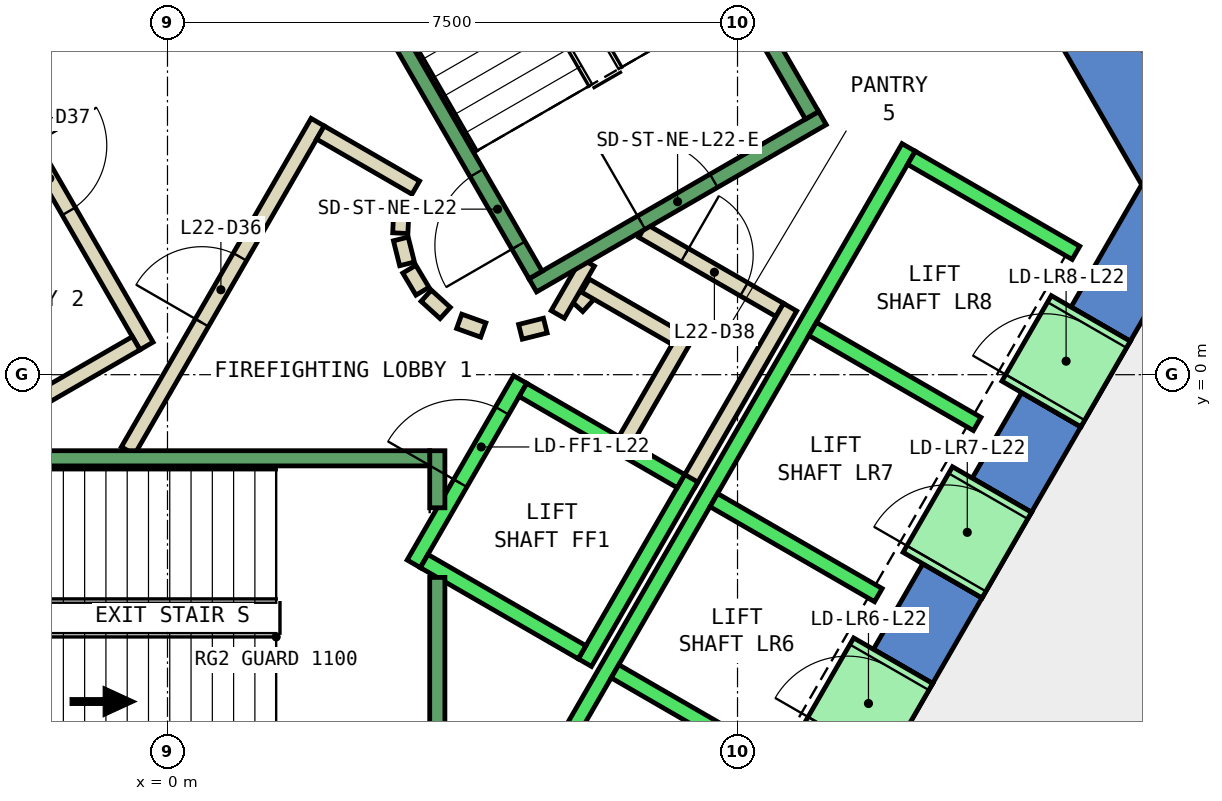
"""IFC4 building model, lengths in metres.
Left out: names, types, materials, properties, quantities, classifications, styles, units other than length and angle.
Written with IfcOpenShell. Run it as: python <this file> out.ifc"""

import sys

from ifc_helpers import new_model, si_unit, direction, frame, frame_2d, origin, place, context, subcontext, project, spatial, polyline, rectangle, outline, extrude, element, fill, save


model = new_model("IFC4")
c1 = context("Model", 3, precision=1e-05, world=origin(), true_north=direction((0.0, 1.0)))
c2 = subcontext(c1, "Body", "Model", "MODEL_VIEW")
j1 = project(units=[si_unit("LENGTHUNIT", "METRE"), si_unit("PLANEANGLEUNIT", "RADIAN")], contexts=[c1])
p1 = place(None, origin())
s1 = spatial("IfcSite", under=j1, at=p1, CompositionType="ELEMENT")
p2 = place(p1, origin())
s2 = spatial("IfcBuilding", under=s1, at=p2, CompositionType="ELEMENT")
p3 = place(p2, frame((0.0, 0.0, 103.4)))
s3 = spatial("IfcBuildingStorey", under=s2, at=p3, CompositionType="ELEMENT", Elevation=103.4)
p4 = place(p3, frame((0.0, 0.0, -0.4)))
e1 = element("IfcWall", 1, at=p4, inside=s3, PredefinedType="SHEAR", context=c2, shape_type="SweptSolid", body=[
    extrude(outline(polyline([(8.517, 11.748), (7.738, 11.298), (12.817, 2.5), (13.856, 2.5), (8.517, 11.748)])), origin(), (0.0, 0.0, 1.0), 4.2),
])
p5 = place(p3, frame((0.0, 0.0, -0.4)))
e2 = element("IfcWall", 2, at=p5, inside=s3, PredefinedType="SHEAR", context=c2, shape_type="SweptSolid", body=[
    extrude(outline(polyline([(10.717, -2.937), (9.938, -2.487), (9.288, -3.613), (10.067, -4.063), (10.717, -2.937)])), origin(), (0.0, 0.0, 1.0), 4.2),
])
p6 = place(p3, frame((0.0, 0.0, -0.4)))
e3 = element("IfcWall", 3, at=p6, inside=s3, PredefinedType="SHEAR", context=c2, shape_type="SweptSolid", body=[
    extrude(outline(polyline([(12.017, -0.686), (11.238, -0.236), (10.588, -1.361), (11.367, -1.811), (12.017, -0.686)])), origin(), (0.0, 0.0, 1.0), 4.2),
])
p7 = place(p3, frame((0.0, 0.0, -0.4)))
e4 = element("IfcWall", 4, at=p7, inside=s3, PredefinedType="SHEAR", context=c2, shape_type="SweptSolid", body=[
    extrude(outline(polyline([(11.888, 0.89), (12.667, 0.44), (13.856, 2.5), (12.817, 2.5), (11.888, 0.89)])), origin(), (0.0, 0.0, 1.0), 4.2),
])
p8 = place(p3, frame((0.0, 0.0, 3.6)))
e5 = element("IfcWall", 5, at=p8, inside=s3, PredefinedType="SHEAR", context=c2, shape_type="SweptSolid", body=[
    extrude(outline(polyline([(10.067, -4.063), (9.288, -3.613), (8.638, -4.739), (9.417, -5.189), (10.067, -4.063)])), origin(), (0.0, 0.0, 1.0), 0.2),
])
p9 = place(p3, frame((0.0, 0.0, 3.6)))
e6 = element("IfcWall", 6, at=p9, inside=s3, PredefinedType="SHEAR", context=c2, shape_type="SweptSolid", body=[
    extrude(outline(polyline([(11.367, -1.811), (10.588, -1.361), (9.938, -2.487), (10.717, -2.937), (11.367, -1.811)])), origin(), (0.0, 0.0, 1.0), 0.2),
])
p10 = place(p3, frame((0.0, 0.0, 3.6)))
e7 = element("IfcWall", 7, at=p10, inside=s3, PredefinedType="SHEAR", context=c2, shape_type="SweptSolid", body=[
    extrude(outline(polyline([(12.667, 0.44), (11.888, 0.89), (11.238, -0.236), (12.017, -0.686), (12.667, 0.44)])), origin(), (0.0, 0.0, 1.0), 0.2),
])
p11 = place(p3, frame((5.39, 0.898, 0.0), z_axis=(0.0, 0.0, 1.0), x_axis=(0.673828488714, 0.738887791073, 0.0)))
e8 = element("IfcWall", 8, at=p11, inside=s3, PredefinedType="PARTITIONING", context=c2, shape_type="SweptSolid", body=[
    extrude(rectangle(XDim=0.263, YDim=0.2, at=frame_2d((0.131, 0.0))), origin(), (0.0, 0.0, 1.0), 3.8),
])
p12 = place(p3, frame((5.499, 1.172, 0.0), z_axis=(0.0, 0.0, 1.0), x_axis=(0.866333505267, -0.499465972466, 0.0)))
e9 = element("IfcWall", 9, at=p12, inside=s3, PredefinedType="PARTITIONING", context=c2, shape_type="SweptSolid", body=[
    extrude(rectangle(XDim=1.374, YDim=0.2, at=frame_2d((0.687, 0.0))), origin(), (0.0, 0.0, 1.0), 3.8),
])
p13 = place(p3, frame((6.826, 0.522, 0.0), z_axis=(0.0, 0.0, 1.0), x_axis=(-0.500016722714, -0.866015748706, 0.0)))
e10 = element("IfcWall", 10, at=p13, inside=s3, PredefinedType="PARTITIONING", context=c2, shape_type="SweptSolid", body=[
    extrude(rectangle(XDim=1.7, YDim=0.2, at=frame_2d((0.85, 0.0))), origin(), (0.0, 0.0, 1.0), 3.8),
])
p14 = place(p3, frame((6.25, 1.894, 0.0), z_axis=(0.0, 0.0, 1.0), x_axis=(0.866043184279, -0.499969202016, 0.0)))
e11 = element("IfcWall", 11, at=p14, inside=s3, PredefinedType="PARTITIONING", context=c2, shape_type="SweptSolid", body=[
    extrude(rectangle(XDim=2.084, YDim=0.2, at=frame_2d((1.042, 0.0))), origin(), (0.0, 0.0, 1.0), 3.8),
])
p15 = place(p14, frame((0.642, 0.0, 0.0)))
e12 = element("IfcOpeningElement", 12, at=p15, cuts=e11, PredefinedType="OPENING", context=c2, shape_type="SweptSolid", body=[
    extrude(rectangle(XDim=0.9, YDim=2.1, at=frame_2d((0.45, 1.05))), frame((0.0, 0.11, 0.0), z_axis=(0.0, -1.0, 0.0), x_axis=(1.0, 0.0, 0.0)), (0.0, 0.0, 1.0), 0.22),
])
p16 = place(p3, frame((8.192, 0.888, 0.0), z_axis=(0.0, 0.0, 1.0), x_axis=(-0.499940625693, -0.866059680843, 0.0)))
e13 = element("IfcWall", 13, at=p16, inside=s3, PredefinedType="PARTITIONING", context=c2, shape_type="SweptSolid", body=[
    extrude(rectangle(XDim=2.68, YDim=0.2, at=frame_2d((1.34, 0.0))), origin(), (0.0, 0.0, 1.0), 3.8),
])
p17 = place(p3, frame((5.135, 0.793, 0.0), z_axis=(0.0, 0.0, 1.0), x_axis=(0.499526442893, 0.866298639529, 0.0)))
e14 = element("IfcWall", 14, at=p17, inside=s3, PredefinedType="PARTITIONING", context=c2, shape_type="SweptSolid", body=[
    extrude(rectangle(XDim=0.791, YDim=0.2, at=frame_2d((0.396, 0.0))), origin(), (0.0, 0.0, 1.0), 3.8),
])
p18 = place(p3, frame((-0.52, -1.0, 0.0), z_axis=(0.0, 0.0, 1.0), x_axis=(0.50011622646, 0.865958290007, 0.0)))
e15 = element("IfcWall", 15, at=p18, inside=s3, PredefinedType="PARTITIONING", context=c2, shape_type="SweptSolid", body=[
    extrude(rectangle(XDim=4.991, YDim=0.2, at=frame_2d((2.496, 0.0))), origin(), (0.0, 0.0, 1.0), 3.8),
])
p19 = place(p18, frame((1.945, 0.0, 0.0)))
e16 = element("IfcOpeningElement", 16, at=p19, cuts=e15, PredefinedType="OPENING", context=c2, shape_type="SweptSolid", body=[
    extrude(rectangle(XDim=1.0, YDim=2.1, at=frame_2d((0.5, 1.05))), frame((0.0, 0.11, 0.0), z_axis=(0.0, -1.0, 0.0), x_axis=(1.0, 0.0, 0.0)), (0.0, 0.0, 1.0), 0.22),
])
p20 = place(p3, frame((2.012, 3.186, 0.0), z_axis=(0.0, 0.0, 1.0), x_axis=(0.865891012941, -0.500232699559, 0.0)))
e17 = element("IfcWall", 17, at=p20, inside=s3, PredefinedType="PARTITIONING", context=c2, shape_type="SweptSolid", body=[
    extrude(rectangle(XDim=1.449, YDim=0.2, at=frame_2d((0.725, 0.0))), origin(), (0.0, 0.0, 1.0), 3.8),
])
p21 = place(p3, frame((3.079, 2.199, 0.0), z_axis=(0.0, 0.0, 1.0), x_axis=(-0.047771483479, -0.998858290933, 0.0)))
e18 = element("IfcWall", 18, at=p21, inside=s3, PredefinedType="PARTITIONING", context=c2, shape_type="SweptSolid", body=[
    extrude(rectangle(XDim=0.337, YDim=0.2, at=frame_2d((0.169, 0.0))), origin(), (0.0, 0.0, 1.0), 3.8),
])
p22 = place(p3, frame((3.07, 1.786, 0.0), z_axis=(0.0, 0.0, 1.0), x_axis=(0.242705583207, -0.970099994784, 0.0)))
e19 = element("IfcWall", 19, at=p22, inside=s3, PredefinedType="PARTITIONING", context=c2, shape_type="SweptSolid", body=[
    extrude(rectangle(XDim=0.338, YDim=0.2, at=frame_2d((0.169, 0.0))), origin(), (0.0, 0.0, 1.0), 3.8),
])
for number, where, z_axis, x_axis in (
    (20, (3.182, 1.388, 0.0), (0.0, 0.0, 1.0), (0.512, -0.859, 0.0)),
    (21, (3.404, 1.039, 0.0), (0.0, 0.0, 1.0), (0.74, -0.672, 0.0)),
):
    element("IfcWall", number, at=place(p3, frame(where, z_axis=z_axis, x_axis=x_axis)), inside=s3, PredefinedType="PARTITIONING", context=c2, shape_type="SweptSolid", body=[
        extrude(rectangle(XDim=0.338, YDim=0.2, at=frame_2d((0.169, 0.0))), origin(), (0.0, 0.0, 1.0), 3.8),
    ])
p23 = place(p3, frame((3.838, 0.702, 0.0), z_axis=(0.0, 0.0, 1.0), x_axis=(0.941035081519, -0.338308993895, 0.0)))
e22 = element("IfcWall", 22, at=p23, inside=s3, PredefinedType="PARTITIONING", context=c2, shape_type="SweptSolid", body=[
    extrude(rectangle(XDim=0.337, YDim=0.2, at=frame_2d((0.168, 0.0))), origin(), (0.0, 0.0, 1.0), 3.8),
])
p24 = place(p3, frame((4.644, 0.564, 0.0), z_axis=(0.0, 0.0, 1.0), x_axis=(0.969929076366, 0.243387729394, 0.0)))
e23 = element("IfcWall", 23, at=p24, inside=s3, PredefinedType="PARTITIONING", context=c2, shape_type="SweptSolid", body=[
    extrude(rectangle(XDim=0.337, YDim=0.2, at=frame_2d((0.168, 0.0))), origin(), (0.0, 0.0, 1.0), 3.8),
])
p25 = place(p3, frame((-2.771, 4.7, 0.0), z_axis=(0.0, 0.0, 1.0), x_axis=(0.499969479948, -0.866043023828, 0.0)))
e24 = element("IfcWall", 24, at=p25, inside=s3, PredefinedType="PARTITIONING", context=c2, shape_type="SweptSolid", body=[
    extrude(rectangle(XDim=4.99, YDim=0.2, at=frame_2d((2.495, 0.0))), origin(), (0.0, 0.0, 1.0), 3.8),
])
p26 = place(p25, frame((1.945, 0.0, 0.0)))
e25 = element("IfcOpeningElement", 25, at=p26, cuts=e24, PredefinedType="OPENING", context=c2, shape_type="SweptSolid", body=[
    extrude(rectangle(XDim=1.0, YDim=2.1, at=frame_2d((0.5, 1.05))), frame((0.0, 0.11, 0.0), z_axis=(0.0, -1.0, 0.0), x_axis=(1.0, 0.0, 0.0)), (0.0, 0.0, 1.0), 0.22),
])
p27 = place(p3, frame((-0.412, 0.414, 0.0), z_axis=(0.0, 0.0, 1.0), x_axis=(-0.866017369001, -0.500013916395, 0.0)))
e26 = element("IfcWall", 26, at=p27, inside=s3, PredefinedType="PARTITIONING", context=c2, shape_type="SweptSolid", body=[
    extrude(rectangle(XDim=1.45, YDim=0.2, at=frame_2d((0.725, 0.0))), origin(), (0.0, 0.0, 1.0), 3.8),
])
p28 = place(p3, frame((18.503, 2.949, 0.0), z_axis=(0.0, 0.0, 1.0), x_axis=(-0.49997390151, -0.86604047123, 0.0)))
e27 = element("IfcWall", 27, at=p28, inside=s3, PredefinedType="PARTITIONING", context=c2, shape_type="SweptSolid", body=[
    extrude(rectangle(XDim=11.626, YDim=0.2, at=frame_2d((5.813, 0.0))), origin(), (0.0, 0.0, 1.0), 3.8),
])
p29 = place(p3, frame((3.24, -2.488, 0.0), z_axis=(0.0, 0.0, 1.0), x_axis=(0.49994636267, 0.866056369097, 0.0)))
e28 = element("IfcWall", 28, at=p29, inside=s3, PredefinedType="STANDARD", context=c2, shape_type="SweptSolid", body=[
    extrude(rectangle(XDim=2.8, YDim=0.2, at=frame_2d((1.4, 0.0))), origin(), (0.0, 0.0, 1.0), 3.8),
])
p30 = place(p29, frame((1.225, 0.0, 0.0)))
e29 = element("IfcOpeningElement", 29, at=p30, cuts=e28, PredefinedType="OPENING", context=c2, shape_type="SweptSolid", body=[
    extrude(rectangle(XDim=1.1, YDim=2.1, at=frame_2d((0.55, 1.05))), frame((0.0, 0.11, 0.0), z_axis=(0.0, -1.0, 0.0), x_axis=(1.0, 0.0, 0.0)), (0.0, 0.0, 1.0), 0.22),
])
p31 = place(p3, frame((5.492, -3.788, 0.0), z_axis=(0.0, 0.0, 1.0), x_axis=(0.500011755427, 0.866018616679, 0.0)))
e30 = element("IfcWall", 30, at=p31, inside=s3, PredefinedType="STANDARD", context=c2, shape_type="SweptSolid", body=[
    extrude(rectangle(XDim=2.8, YDim=0.2, at=frame_2d((1.4, 0.0))), origin(), (0.0, 0.0, 1.0), 3.8),
])
p32 = place(p3, frame((3.377, -2.452, 0.0), z_axis=(0.0, 0.0, 1.0), x_axis=(0.865955154139, -0.50012165622, 0.0)))
e31 = element("IfcWall", 31, at=p32, inside=s3, PredefinedType="STANDARD", context=c2, shape_type="SweptSolid", body=[
    extrude(rectangle(XDim=2.4, YDim=0.2, at=frame_2d((1.2, 0.0))), origin(), (0.0, 0.0, 1.0), 3.8),
])
p33 = place(p3, frame((4.677, -0.2, 0.0), z_axis=(0.0, 0.0, 1.0), x_axis=(0.865973769406, -0.500089422704, 0.0)))
e32 = element("IfcWall", 32, at=p33, inside=s3, PredefinedType="STANDARD", context=c2, shape_type="SweptSolid", body=[
    extrude(rectangle(XDim=2.399, YDim=0.2, at=frame_2d((1.2, 0.0))), origin(), (0.0, 0.0, 1.0), 3.8),
])
p34 = place(p3, frame((4.451, -6.19, 0.0), z_axis=(0.0, 0.0, 1.0), x_axis=(0.50000090737, 0.866024879913, 0.0)))
e33 = element("IfcWall", 33, at=p34, inside=s3, PredefinedType="STANDARD", context=c2, shape_type="SweptSolid", body=[
    extrude(rectangle(XDim=10.6, YDim=0.2, at=frame_2d((5.3, 0.0))), origin(), (0.0, 0.0, 1.0), 3.8),
])
for number, where, z_axis, x_axis in (
    (34, (5.888, -3.902, 0.0), (0.0, 0.0, 1.0), (0.866, -0.5, 0.0)),
    (35, (7.188, -1.65, 0.0), (0.0, 0.0, 1.0), (0.866, -0.5, 0.0)),
    (36, (8.488, 0.602, 0.0), (0.0, 0.0, 1.0), (0.866, -0.5, 0.0)),
):
    element("IfcWall", number, at=place(p3, frame(where, z_axis=z_axis, x_axis=x_axis)), inside=s3, PredefinedType="STANDARD", context=c2, shape_type="SweptSolid", body=[
        extrude(rectangle(XDim=2.5, YDim=0.2, at=frame_2d((1.25, 0.0))), origin(), (0.0, 0.0, 1.0), 3.8),
    ])
p35 = place(p3, frame((9.788, 2.853, 0.0), z_axis=(0.0, 0.0, 1.0), x_axis=(0.865998541277, -0.500046524342, 0.0)))
e37 = element("IfcWall", 37, at=p35, inside=s3, PredefinedType="STANDARD", context=c2, shape_type="SweptSolid", body=[
    extrude(rectangle(XDim=2.5, YDim=0.2, at=frame_2d((1.25, 0.0))), origin(), (0.0, 0.0, 1.0), 3.8),
])
p36 = place(p3, frame((8.898, -4.889, 0.0), z_axis=(0.0, 0.0, 1.0), x_axis=(0.500036693733, 0.866004217611, 0.0)))
e38 = element("IfcWall", 38, at=p36, inside=s3, PredefinedType="STANDARD", context=c2, shape_type="SweptSolid", body=[
    extrude(rectangle(XDim=1.3, YDim=1.2, at=frame_2d((0.65, 0.0))), origin(), (0.0, 0.0, 1.0), 2.4),
])
p37 = place(p36, frame((0.1, 0.0, 0.0)))
e39 = element("IfcOpeningElement", 39, at=p37, cuts=e38, PredefinedType="OPENING", context=c2, shape_type="SweptSolid", body=[
    extrude(rectangle(XDim=1.1, YDim=2.3, at=frame_2d((0.55, 1.15))), frame((0.0, 0.61, 0.0), z_axis=(0.0, -1.0, 0.0), x_axis=(1.0, 0.0, 0.0)), (0.0, 0.0, 1.0), 1.22),
])
p38 = place(p3, frame((10.198, -2.637, 0.0), z_axis=(0.0, 0.0, 1.0), x_axis=(0.49989585183, 0.866085525409, 0.0)))
e40 = element("IfcWall", 40, at=p38, inside=s3, PredefinedType="STANDARD", context=c2, shape_type="SweptSolid", body=[
    extrude(rectangle(XDim=1.3, YDim=1.2, at=frame_2d((0.65, 0.0))), origin(), (0.0, 0.0, 1.0), 2.4),
])
p39 = place(p38, frame((0.1, 0.0, 0.0)))
e41 = element("IfcOpeningElement", 41, at=p39, cuts=e40, PredefinedType="OPENING", context=c2, shape_type="SweptSolid", body=[
    extrude(rectangle(XDim=1.1, YDim=2.3, at=frame_2d((0.55, 1.15))), frame((0.0, 0.61, 0.0), z_axis=(0.0, -1.0, 0.0), x_axis=(1.0, 0.0, 0.0)), (0.0, 0.0, 1.0), 1.22),
])
p40 = place(p3, frame((11.498, -0.385, 0.0), z_axis=(0.0, 0.0, 1.0), x_axis=(0.500221244143, 0.865897630733, 0.0)))
e42 = element("IfcWall", 42, at=p40, inside=s3, PredefinedType="STANDARD", context=c2, shape_type="SweptSolid", body=[
    extrude(rectangle(XDim=1.299, YDim=1.2, at=frame_2d((0.65, 0.0))), origin(), (0.0, 0.0, 1.0), 2.4),
])
p41 = place(p40, frame((0.1, 0.0, 0.0)))
e43 = element("IfcOpeningElement", 43, at=p41, cuts=e42, PredefinedType="OPENING", context=c2, shape_type="SweptSolid", body=[
    extrude(rectangle(XDim=1.1, YDim=2.3, at=frame_2d((0.55, 1.15))), frame((0.0, 0.61, 0.0), z_axis=(0.0, -1.0, 0.0), x_axis=(1.0, 0.0, 0.0)), (0.0, 0.0, 1.0), 1.22),
])
p42 = place(p3, frame((3.55, -2.667, 0.0), z_axis=(0.0, 0.0, 1.0), x_axis=(0.0, -1.0, 0.0)))
e44 = element("IfcWall", 44, at=p42, inside=s3, PredefinedType="STANDARD", context=c2, shape_type="SweptSolid", body=[
    extrude(rectangle(XDim=2.733, YDim=0.2, at=frame_2d((1.366, 0.0))), origin(), (0.0, 0.0, 1.0), 3.8),
])
p43 = place(p3, frame((3.55, -1.0, 0.0), z_axis=(0.0, 0.0, 1.0), x_axis=(0.0, -1.0, 0.0)))
e45 = element("IfcWall", 45, at=p43, inside=s3, PredefinedType="STANDARD", context=c2, shape_type="SweptSolid", body=[
    extrude(rectangle(XDim=0.751, YDim=0.2, at=frame_2d((0.375, 0.0))), origin(), (0.0, 0.0, 1.0), 3.8),
])
p44 = place(p3, frame((-3.45, -1.1, 0.0), z_axis=(0.0, 0.0, 1.0), x_axis=(1.0, 0.0, 0.0)))
e46 = element("IfcWall", 46, at=p44, inside=s3, PredefinedType="STANDARD", context=c2, shape_type="SweptSolid", body=[
    extrude(rectangle(XDim=6.9, YDim=0.2, at=frame_2d((3.45, 0.0))), origin(), (0.0, 0.0, 1.0), 3.8),
])
p45 = place(p44, frame((0.45, 0.0, 0.0)))
e47 = element("IfcOpeningElement", 47, at=p45, cuts=e46, PredefinedType="OPENING", context=c2, shape_type="SweptSolid", body=[
    extrude(rectangle(XDim=1.1, YDim=2.2, at=frame_2d((0.55, 1.1))), frame((0.0, 0.11, 0.0), z_axis=(0.0, -1.0, 0.0), x_axis=(1.0, 0.0, 0.0)), (0.0, 0.0, 1.0), 0.22),
])
p46 = place(p3, frame((4.806, 1.176, 0.0), z_axis=(0.0, 0.0, 1.0), x_axis=(0.866059941101, 0.499940174841, 0.0)))
e48 = element("IfcWall", 48, at=p46, inside=s3, PredefinedType="STANDARD", context=c2, shape_type="SweptSolid", body=[
    extrude(rectangle(XDim=4.4, YDim=0.2, at=frame_2d((2.2, 0.0))), origin(), (0.0, 0.0, 1.0), 3.8),
])
p47 = place(p46, frame((1.65, 0.0, 0.0)))
e49 = element("IfcOpeningElement", 49, at=p47, cuts=e48, PredefinedType="OPENING", context=c2, shape_type="SweptSolid", body=[
    extrude(rectangle(XDim=1.1, YDim=2.2, at=frame_2d((0.55, 1.1))), frame((0.0, 0.11, 0.0), z_axis=(0.0, -1.0, 0.0), x_axis=(1.0, 0.0, 0.0)), (0.0, 0.0, 1.0), 0.22),
])
p48 = place(p3, frame((4.843, 1.312, 0.0), z_axis=(0.0, 0.0, 1.0), x_axis=(-0.499963383562, 0.866046543262, 0.0)))
e50 = element("IfcWall", 50, at=p48, inside=s3, PredefinedType="STANDARD", context=c2, shape_type="SweptSolid", body=[
    extrude(rectangle(XDim=6.9, YDim=0.2, at=frame_2d((3.45, 0.0))), origin(), (0.0, 0.0, 1.0), 3.8),
])
p49 = place(p48, frame((0.45, 0.0, 0.0)))
e51 = element("IfcOpeningElement", 51, at=p49, cuts=e50, PredefinedType="OPENING", context=c2, shape_type="SweptSolid", body=[
    extrude(rectangle(XDim=1.1, YDim=2.2, at=frame_2d((0.55, 1.1))), frame((0.0, 0.11, 0.0), z_axis=(0.0, -1.0, 0.0), x_axis=(1.0, 0.0, 0.0)), (0.0, 0.0, 1.0), 0.22),
])
p50 = place(p3, frame((8.48, 3.412, 0.0), z_axis=(0.0, 0.0, 1.0), x_axis=(-0.499978703459, 0.866037698999, 0.0)))
e52 = element("IfcWall", 52, at=p50, inside=s3, PredefinedType="STANDARD", context=c2, shape_type="SweptSolid", body=[
    extrude(rectangle(XDim=6.9, YDim=0.2, at=frame_2d((3.45, 0.0))), origin(), (0.0, 0.0, 1.0), 3.8),
])
p51 = place(p3, frame((-1.393, 7.288, 0.0), z_axis=(0.0, 0.0, 1.0), x_axis=(-0.499963383562, -0.866046543262, 0.0)))
e53 = element("IfcWall", 53, at=p51, inside=s3, PredefinedType="STANDARD", context=c2, shape_type="SweptSolid", body=[
    extrude(rectangle(XDim=6.9, YDim=0.2, at=frame_2d((3.45, 0.0))), origin(), (0.0, 0.0, 1.0), 3.8),
])
p52 = place(p51, frame((0.45, 0.0, 0.0)))
e54 = element("IfcOpeningElement", 54, at=p52, cuts=e53, PredefinedType="OPENING", context=c2, shape_type="SweptSolid", body=[
    extrude(rectangle(XDim=1.1, YDim=2.2, at=frame_2d((0.55, 1.1))), frame((0.0, 0.11, 0.0), z_axis=(0.0, -1.0, 0.0), x_axis=(1.0, 0.0, 0.0)), (0.0, 0.0, 1.0), 0.22),
])
p53 = place(p19, origin())
e55 = element("IfcDoor", 55, at=p53, inside=s3, OperationType="SINGLE_SWING_LEFT", PredefinedType="DOOR", context=c2, shape_type="SweptSolid", body=[
    extrude(rectangle(XDim=1.0, YDim=2.1, at=frame_2d((0.5, 1.05))), frame((0.0, 0.025, 0.0), z_axis=(0.0, -1.0, 0.0), x_axis=(1.0, 0.0, 0.0)), (0.0, 0.0, 1.0), 0.05),
])
fill(e16, e55)
p54 = place(p26, origin())
e56 = element("IfcDoor", 56, at=p54, inside=s3, OperationType="SINGLE_SWING_RIGHT", PredefinedType="DOOR", context=c2, shape_type="SweptSolid", body=[
    extrude(rectangle(XDim=1.0, YDim=2.1, at=frame_2d((0.5, 1.05))), frame((0.0, 0.025, 0.0), z_axis=(0.0, -1.0, 0.0), x_axis=(1.0, 0.0, 0.0)), (0.0, 0.0, 1.0), 0.05),
])
fill(e25, e56)
p55 = place(p15, origin())
e57 = element("IfcDoor", 57, at=p55, inside=s3, OperationType="SINGLE_SWING_LEFT", PredefinedType="DOOR", context=c2, shape_type="SweptSolid", body=[
    extrude(rectangle(XDim=0.9, YDim=2.1, at=frame_2d((0.45, 1.05))), frame((0.0, 0.025, 0.0), z_axis=(0.0, -1.0, 0.0), x_axis=(1.0, 0.0, 0.0)), (0.0, 0.0, 1.0), 0.05),
])
fill(e12, e57)
p56 = place(p37, origin())
e58 = element("IfcDoor", 58, at=p56, inside=s3, OperationType="SLIDING_TO_LEFT", PredefinedType="DOOR", context=c2, shape_type="SweptSolid", body=[
    extrude(rectangle(XDim=1.1, YDim=2.3, at=frame_2d((0.55, 1.15))), frame((0.0, 0.025, 0.0), z_axis=(0.0, -1.0, 0.0), x_axis=(1.0, 0.0, 0.0)), (0.0, 0.0, 1.0), 0.05),
])
fill(e39, e58)
p57 = place(p39, origin())
e59 = element("IfcDoor", 59, at=p57, inside=s3, OperationType="SLIDING_TO_LEFT", PredefinedType="DOOR", context=c2, shape_type="SweptSolid", body=[
    extrude(rectangle(XDim=1.1, YDim=2.3, at=frame_2d((0.55, 1.15))), frame((0.0, 0.025, 0.0), z_axis=(0.0, -1.0, 0.0), x_axis=(1.0, 0.0, 0.0)), (0.0, 0.0, 1.0), 0.05),
])
fill(e41, e59)
p58 = place(p41, origin())
e60 = element("IfcDoor", 60, at=p58, inside=s3, OperationType="SLIDING_TO_LEFT", PredefinedType="DOOR", context=c2, shape_type="SweptSolid", body=[
    extrude(rectangle(XDim=1.1, YDim=2.3, at=frame_2d((0.55, 1.15))), frame((0.0, 0.025, 0.0), z_axis=(0.0, -1.0, 0.0), x_axis=(1.0, 0.0, 0.0)), (0.0, 0.0, 1.0), 0.05),
])
fill(e43, e60)
p59 = place(p30, origin())
e61 = element("IfcDoor", 61, at=p59, inside=s3, OperationType="SLIDING_TO_LEFT", PredefinedType="DOOR", context=c2, shape_type="SweptSolid", body=[
    extrude(rectangle(XDim=1.1, YDim=2.1, at=frame_2d((0.55, 1.05))), frame((0.0, 0.025, 0.0), z_axis=(0.0, -1.0, 0.0), x_axis=(1.0, 0.0, 0.0)), (0.0, 0.0, 1.0), 0.05),
])
fill(e29, e61)
p60 = place(p49, origin())
e62 = element("IfcDoor", 62, at=p60, inside=s3, OperationType="SINGLE_SWING_LEFT", PredefinedType="DOOR", context=c2, shape_type="SweptSolid", body=[
    extrude(rectangle(XDim=1.1, YDim=2.2, at=frame_2d((0.55, 1.1))), frame((0.0, 0.025, 0.0), z_axis=(0.0, -1.0, 0.0), x_axis=(1.0, 0.0, 0.0)), (0.0, 0.0, 1.0), 0.05),
])
fill(e51, e62)
p61 = place(p47, origin())
e63 = element("IfcDoor", 63, at=p61, inside=s3, OperationType="SINGLE_SWING_LEFT", PredefinedType="DOOR", context=c2, shape_type="SweptSolid", body=[
    extrude(rectangle(XDim=1.1, YDim=2.2, at=frame_2d((0.55, 1.1))), frame((0.0, 0.025, 0.0), z_axis=(0.0, -1.0, 0.0), x_axis=(1.0, 0.0, 0.0)), (0.0, 0.0, 1.0), 0.05),
])
fill(e49, e63)
save(model, sys.argv[1])
